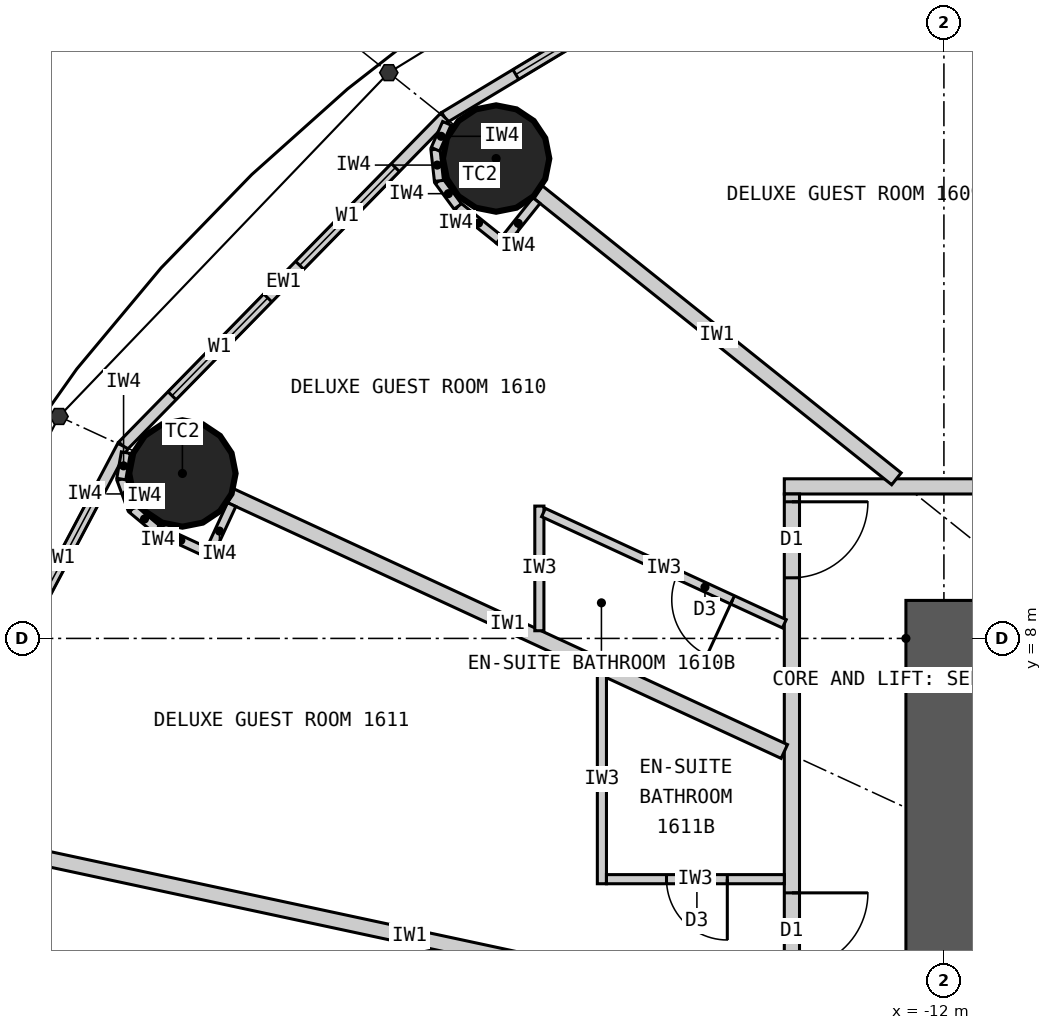
"""IFC4 building model, lengths in metres.
Left out: names, types, materials, properties, quantities, classifications, styles, units other than length and angle.
Written with IfcOpenShell. Run it as: python <this file> out.ifc"""

import sys

from ifc_helpers import new_model, si_unit, direction, frame, frame_2d, origin, origin_2d, place, context, subcontext, project, spatial, rectangle, circle, extrude, element, fill, save


model = new_model("IFC4")
c1 = context("Model", 3, precision=1e-05, world=origin(), true_north=direction((0.0, 1.0)))
c2 = subcontext(c1, "Body", "Model", "MODEL_VIEW")
j1 = project(units=[si_unit("LENGTHUNIT", "METRE"), si_unit("PLANEANGLEUNIT", "RADIAN")], contexts=[c1])
p1 = place(None, origin())
s1 = spatial("IfcSite", under=j1, at=p1, CompositionType="ELEMENT")
p2 = place(p1, origin())
s2 = spatial("IfcBuilding", under=s1, at=p2, CompositionType="ELEMENT")
p3 = place(p2, frame((0.0, 0.0, 67.2)))
s3 = spatial("IfcBuildingStorey", under=s2, at=p3, CompositionType="ELEMENT", Elevation=67.2)
for number, where, z_axis, x_axis in (
    (1, (-17.892, 14.313, 0.0), (0.0, 0.0, 1.0), (1.0, 0.0, 0.0)),
    (2, (-22.019, 10.17, 0.0), (0.0, 0.0, 1.0), (1.0, 0.0, 0.0)),
):
    element("IfcColumn", number, at=place(p3, frame(where, z_axis=z_axis, x_axis=x_axis)), inside=s3, PredefinedType="COLUMN", context=c2, shape_type="SweptSolid", body=[
        extrude(circle(Radius=0.7, at=origin_2d()), origin(), (0.0, 0.0, 1.0), 3.3),
    ])
p4 = place(p3, frame((-12.5, 8.0, 0.0), z_axis=(0.0, 0.0, 1.0), x_axis=(1.0, 0.0, 0.0)))
e3 = element("IfcWall", 3, at=p4, inside=s3, PredefinedType="SHEAR", context=c2, shape_type="SweptSolid", body=[
    extrude(rectangle(XDim=25.0, YDim=1.0, at=frame_2d((12.5, 0.0))), origin(), (0.0, 0.0, 1.0), 3.3),
])
p5 = place(p4, frame((11.2, 0.0, 0.0)))
e4 = element("IfcOpeningElement", 4, at=p5, cuts=e3, PredefinedType="OPENING", context=c2, shape_type="SweptSolid", body=[
    extrude(rectangle(XDim=1.2, YDim=2.2, at=frame_2d((0.6, 1.1))), frame((0.0, 0.51, 0.0), z_axis=(0.0, -1.0, 0.0), x_axis=(1.0, 0.0, 0.0)), (0.0, 0.0, 1.0), 1.02),
])
p6 = place(p4, frame((18.8, 0.0, 0.0)))
e5 = element("IfcOpeningElement", 5, at=p6, cuts=e3, PredefinedType="OPENING", context=c2, shape_type="SweptSolid", body=[
    extrude(rectangle(XDim=0.9, YDim=2.2, at=frame_2d((0.45, 1.1))), frame((0.0, 0.51, 0.0), z_axis=(0.0, -1.0, 0.0), x_axis=(1.0, 0.0, 0.0)), (0.0, 0.0, 1.0), 1.02),
])
p7 = place(p3, frame((-12.0, 7.5, 0.0), z_axis=(0.0, 0.0, 1.0), x_axis=(0.0, -1.0, 0.0)))
e6 = element("IfcWall", 6, at=p7, inside=s3, PredefinedType="SHEAR", context=c2, shape_type="SweptSolid", body=[
    extrude(rectangle(XDim=15.0, YDim=1.0, at=frame_2d((7.5, 0.0))), origin(), (0.0, 0.0, 1.0), 3.3),
])
p8 = place(p7, frame((6.6, 0.0, 0.0)))
e7 = element("IfcOpeningElement", 7, at=p8, cuts=e6, PredefinedType="OPENING", context=c2, shape_type="SweptSolid", body=[
    extrude(rectangle(XDim=1.8, YDim=2.2, at=frame_2d((0.9, 1.1))), frame((0.0, 0.51, 0.0), z_axis=(0.0, -1.0, 0.0), x_axis=(1.0, 0.0, 0.0)), (0.0, 0.0, 1.0), 1.02),
])
p9 = place(p3, frame((-13.096, 18.147, 0.0), z_axis=(0.0, 0.0, 1.0), x_axis=(-0.856983180864, -0.515344377787, 0.0)))
e8 = element("IfcWall", 8, at=p9, inside=s3, PredefinedType="ELEMENTEDWALL", context=c2, shape_type="SweptSolid", body=[
    extrude(rectangle(XDim=6.386, YDim=0.15, at=frame_2d((3.193, 0.0))), origin(), (0.0, 0.0, 1.0), 3.12),
])
p10 = place(p9, frame((1.093, 0.0, 0.9)))
e9 = element("IfcOpeningElement", 9, at=p10, cuts=e8, PredefinedType="OPENING", context=c2, shape_type="SweptSolid", body=[
    extrude(rectangle(XDim=1.8, YDim=1.9, at=frame_2d((0.9, 0.95))), frame((0.0, 0.085, 0.0), z_axis=(0.0, -1.0, 0.0), x_axis=(1.0, 0.0, 0.0)), (0.0, 0.0, 1.0), 0.17),
])
p11 = place(p9, frame((3.493, 0.0, 0.9)))
e10 = element("IfcOpeningElement", 10, at=p11, cuts=e8, PredefinedType="OPENING", context=c2, shape_type="SweptSolid", body=[
    extrude(rectangle(XDim=1.8, YDim=1.9, at=frame_2d((0.9, 0.95))), frame((0.0, 0.085, 0.0), z_axis=(0.0, -1.0, 0.0), x_axis=(1.0, 0.0, 0.0)), (0.0, 0.0, 1.0), 0.17),
])
p12 = place(p3, frame((-18.57, 14.856, 0.0), z_axis=(0.0, 0.0, 1.0), x_axis=(-0.699602905915, -0.714531856557, 0.0)))
e11 = element("IfcWall", 11, at=p12, inside=s3, PredefinedType="ELEMENTEDWALL", context=c2, shape_type="SweptSolid", body=[
    extrude(rectangle(XDim=6.051, YDim=0.15, at=frame_2d((3.025, 0.0))), origin(), (0.0, 0.0, 1.0), 3.12),
])
p13 = place(p12, frame((0.926, 0.0, 0.9)))
e12 = element("IfcOpeningElement", 12, at=p13, cuts=e11, PredefinedType="OPENING", context=c2, shape_type="SweptSolid", body=[
    extrude(rectangle(XDim=1.8, YDim=1.9, at=frame_2d((0.9, 0.95))), frame((0.0, 0.085, 0.0), z_axis=(0.0, -1.0, 0.0), x_axis=(1.0, 0.0, 0.0)), (0.0, 0.0, 1.0), 0.17),
])
p14 = place(p12, frame((3.325, 0.0, 0.9)))
e13 = element("IfcOpeningElement", 13, at=p14, cuts=e11, PredefinedType="OPENING", context=c2, shape_type="SweptSolid", body=[
    extrude(rectangle(XDim=1.8, YDim=1.9, at=frame_2d((0.9, 0.95))), frame((0.0, 0.085, 0.0), z_axis=(0.0, -1.0, 0.0), x_axis=(1.0, 0.0, 0.0)), (0.0, 0.0, 1.0), 0.17),
])
p15 = place(p3, frame((-22.803, 10.532, 0.0), z_axis=(0.0, 0.0, 1.0), x_axis=(-0.467296867008, -0.884100468321, 0.0)))
e14 = element("IfcWall", 14, at=p15, inside=s3, PredefinedType="ELEMENTEDWALL", context=c2, shape_type="SweptSolid", body=[
    extrude(rectangle(XDim=5.734, YDim=0.15, at=frame_2d((2.867, 0.0))), origin(), (0.0, 0.0, 1.0), 3.12),
])
p16 = place(p15, frame((0.767, 0.0, 0.9)))
e15 = element("IfcOpeningElement", 15, at=p16, cuts=e14, PredefinedType="OPENING", context=c2, shape_type="SweptSolid", body=[
    extrude(rectangle(XDim=1.8, YDim=1.9, at=frame_2d((0.9, 0.95))), frame((0.0, 0.085, 0.0), z_axis=(0.0, -1.0, 0.0), x_axis=(1.0, 0.0, 0.0)), (0.0, 0.0, 1.0), 0.17),
])
p17 = place(p15, frame((3.167, 0.0, 0.9)))
e16 = element("IfcOpeningElement", 16, at=p17, cuts=e14, PredefinedType="OPENING", context=c2, shape_type="SweptSolid", body=[
    extrude(rectangle(XDim=1.8, YDim=1.9, at=frame_2d((0.9, 0.95))), frame((0.0, 0.085, 0.0), z_axis=(0.0, -1.0, 0.0), x_axis=(1.0, 0.0, 0.0)), (0.0, 0.0, 1.0), 0.17),
])
p18 = place(p3, frame((-14.1, 10.0, 0.0), z_axis=(0.0, 0.0, 1.0), x_axis=(1.0, 0.0, 0.0)))
e17 = element("IfcWall", 17, at=p18, inside=s3, PredefinedType="PARTITIONING", context=c2, shape_type="SweptSolid", body=[
    extrude(rectangle(XDim=28.2, YDim=0.2, at=frame_2d((14.1, 0.0))), origin(), (0.0, 0.0, 1.0), 3.12),
])
p19 = place(p18, frame((18.529, 0.0, 0.0)))
e18 = element("IfcOpeningElement", 18, at=p19, cuts=e17, PredefinedType="OPENING", context=c2, shape_type="SweptSolid", body=[
    extrude(rectangle(XDim=1.0, YDim=2.2, at=frame_2d((0.5, 1.1))), frame((0.0, 0.11, 0.0), z_axis=(0.0, -1.0, 0.0), x_axis=(1.0, 0.0, 0.0)), (0.0, 0.0, 1.0), 0.22),
])
p20 = place(p18, frame((14.623, 0.0, 0.0)))
e19 = element("IfcOpeningElement", 19, at=p20, cuts=e17, PredefinedType="OPENING", context=c2, shape_type="SweptSolid", body=[
    extrude(rectangle(XDim=1.0, YDim=2.2, at=frame_2d((0.5, 1.1))), frame((0.0, 0.11, 0.0), z_axis=(0.0, -1.0, 0.0), x_axis=(1.0, 0.0, 0.0)), (0.0, 0.0, 1.0), 0.22),
])
p21 = place(p18, frame((11.24, 0.0, 0.0)))
e20 = element("IfcOpeningElement", 20, at=p21, cuts=e17, PredefinedType="OPENING", context=c2, shape_type="SweptSolid", body=[
    extrude(rectangle(XDim=1.0, YDim=2.2, at=frame_2d((0.5, 1.1))), frame((0.0, 0.11, 0.0), z_axis=(0.0, -1.0, 0.0), x_axis=(1.0, 0.0, 0.0)), (0.0, 0.0, 1.0), 0.22),
])
p22 = place(p18, frame((8.671, 0.0, 0.0)))
e21 = element("IfcOpeningElement", 21, at=p22, cuts=e17, PredefinedType="OPENING", context=c2, shape_type="SweptSolid", body=[
    extrude(rectangle(XDim=1.0, YDim=2.2, at=frame_2d((0.5, 1.1))), frame((0.0, 0.11, 0.0), z_axis=(0.0, -1.0, 0.0), x_axis=(1.0, 0.0, 0.0)), (0.0, 0.0, 1.0), 0.22),
])
p23 = place(p18, frame((2.801, 0.0, 0.0)))
e22 = element("IfcOpeningElement", 22, at=p23, cuts=e17, PredefinedType="OPENING", context=c2, shape_type="SweptSolid", body=[
    extrude(rectangle(XDim=1.0, YDim=2.2, at=frame_2d((0.5, 1.1))), frame((0.0, 0.11, 0.0), z_axis=(0.0, -1.0, 0.0), x_axis=(1.0, 0.0, 0.0)), (0.0, 0.0, 1.0), 0.22),
])
p24 = place(p3, frame((-14.0, 9.9, 0.0), z_axis=(0.0, 0.0, 1.0), x_axis=(0.0, -1.0, 0.0)))
e23 = element("IfcWall", 23, at=p24, inside=s3, PredefinedType="PARTITIONING", context=c2, shape_type="SweptSolid", body=[
    extrude(rectangle(XDim=19.8, YDim=0.2, at=frame_2d((9.9, 0.0))), origin(), (0.0, 0.0, 1.0), 3.12),
])
p25 = place(p24, frame((0.103, 0.0, 0.0)))
e24 = element("IfcOpeningElement", 24, at=p25, cuts=e23, PredefinedType="OPENING", context=c2, shape_type="SweptSolid", body=[
    extrude(rectangle(XDim=1.0, YDim=2.2, at=frame_2d((0.5, 1.1))), frame((0.0, 0.11, 0.0), z_axis=(0.0, -1.0, 0.0), x_axis=(1.0, 0.0, 0.0)), (0.0, 0.0, 1.0), 0.22),
])
p26 = place(p24, frame((5.248, 0.0, 0.0)))
e25 = element("IfcOpeningElement", 25, at=p26, cuts=e23, PredefinedType="OPENING", context=c2, shape_type="SweptSolid", body=[
    extrude(rectangle(XDim=1.0, YDim=2.2, at=frame_2d((0.5, 1.1))), frame((0.0, 0.11, 0.0), z_axis=(0.0, -1.0, 0.0), x_axis=(1.0, 0.0, 0.0)), (0.0, 0.0, 1.0), 0.22),
])
p27 = place(p24, frame((9.438, 0.0, 0.0)))
e26 = element("IfcOpeningElement", 26, at=p27, cuts=e23, PredefinedType="OPENING", context=c2, shape_type="SweptSolid", body=[
    extrude(rectangle(XDim=1.0, YDim=2.2, at=frame_2d((0.5, 1.1))), frame((0.0, 0.11, 0.0), z_axis=(0.0, -1.0, 0.0), x_axis=(1.0, 0.0, 0.0)), (0.0, 0.0, 1.0), 0.22),
])
p28 = place(p24, frame((13.942, 0.0, 0.0)))
e27 = element("IfcOpeningElement", 27, at=p28, cuts=e23, PredefinedType="OPENING", context=c2, shape_type="SweptSolid", body=[
    extrude(rectangle(XDim=1.0, YDim=2.2, at=frame_2d((0.5, 1.1))), frame((0.0, 0.11, 0.0), z_axis=(0.0, -1.0, 0.0), x_axis=(1.0, 0.0, 0.0)), (0.0, 0.0, 1.0), 0.22),
])
p29 = place(p24, frame((18.698, 0.0, 0.0)))
e28 = element("IfcOpeningElement", 28, at=p29, cuts=e23, PredefinedType="OPENING", context=c2, shape_type="SweptSolid", body=[
    extrude(rectangle(XDim=1.0, YDim=2.2, at=frame_2d((0.5, 1.1))), frame((0.0, 0.11, 0.0), z_axis=(0.0, -1.0, 0.0), x_axis=(1.0, 0.0, 0.0)), (0.0, 0.0, 1.0), 0.22),
])
p30 = place(p3, frame((-7.289, 10.1, 0.0), z_axis=(0.0, 0.0, 1.0), x_axis=(-0.585198353053, 0.810890182197, 0.0)))
e29 = element("IfcWall", 29, at=p30, inside=s3, PredefinedType="PARTITIONING", context=c2, shape_type="SweptSolid", body=[
    extrude(rectangle(XDim=8.36, YDim=0.2, at=frame_2d((4.18, 0.0))), origin(), (0.0, 0.0, 1.0), 2.32),
])
p31 = place(p3, frame((-12.625, 10.1, 0.0), z_axis=(0.0, 0.0, 1.0), x_axis=(-0.780892451574, 0.624665493744, 0.0)))
e30 = element("IfcWall", 30, at=p31, inside=s3, PredefinedType="PARTITIONING", context=c2, shape_type="SweptSolid", body=[
    extrude(rectangle(XDim=6.045, YDim=0.2, at=frame_2d((3.022, 0.0))), origin(), (0.0, 0.0, 1.0), 2.32),
])
p32 = place(p3, frame((-14.1, 6.512, 0.0), z_axis=(0.0, 0.0, 1.0), x_axis=(-0.907832871056, 0.419332181247, 0.0)))
e31 = element("IfcWall", 31, at=p32, inside=s3, PredefinedType="PARTITIONING", context=c2, shape_type="SweptSolid", body=[
    extrude(rectangle(XDim=8.023, YDim=0.2, at=frame_2d((4.011, 0.0))), origin(), (0.0, 0.0, 1.0), 2.32),
])
p33 = place(p3, frame((-14.1, 3.022, 0.0), z_axis=(0.0, 0.0, 1.0), x_axis=(-0.977790014929, 0.209586943072, 0.0)))
e32 = element("IfcWall", 32, at=p33, inside=s3, PredefinedType="PARTITIONING", context=c2, shape_type="SweptSolid", body=[
    extrude(rectangle(XDim=10.087, YDim=0.2, at=frame_2d((5.043, 0.0))), origin(), (0.0, 0.0, 1.0), 2.32),
])
p34 = place(p3, frame((-17.323, 8.101, 0.0), z_axis=(0.0, 0.0, 1.0), x_axis=(0.0, 1.0, 0.0)))
e33 = element("IfcWall", 33, at=p34, inside=s3, PredefinedType="PARTITIONING", context=c2, shape_type="SweptSolid", body=[
    extrude(rectangle(XDim=1.64, YDim=0.12, at=frame_2d((0.82, 0.0))), origin(), (0.0, 0.0, 1.0), 3.12),
])
p35 = place(p3, frame((-14.1, 8.193, 0.0), z_axis=(0.0, 0.0, 1.0), x_axis=(-0.907836493557, 0.419324338628, 0.0)))
e34 = element("IfcWall", 34, at=p35, inside=s3, PredefinedType="PARTITIONING", context=c2, shape_type="SweptSolid", body=[
    extrude(rectangle(XDim=3.49, YDim=0.12, at=frame_2d((1.745, 0.0))), origin(), (0.0, 0.0, 1.0), 3.12),
])
p36 = place(p35, frame((0.75, 0.0, 0.0)))
e35 = element("IfcOpeningElement", 35, at=p36, cuts=e34, PredefinedType="OPENING", context=c2, shape_type="SweptSolid", body=[
    extrude(rectangle(XDim=0.8, YDim=2.1, at=frame_2d((0.4, 1.05))), frame((0.0, 0.07, 0.0), z_axis=(0.0, -1.0, 0.0), x_axis=(1.0, 0.0, 0.0)), (0.0, 0.0, 1.0), 0.14),
])
p37 = place(p3, frame((-16.5, 7.521, 0.0), z_axis=(0.0, 0.0, 1.0), x_axis=(0.0, -1.0, 0.0)))
e36 = element("IfcWall", 36, at=p37, inside=s3, PredefinedType="PARTITIONING", context=c2, shape_type="SweptSolid", body=[
    extrude(rectangle(XDim=2.749, YDim=0.12, at=frame_2d((1.374, 0.0))), origin(), (0.0, 0.0, 1.0), 3.12),
])
p38 = place(p3, frame((-14.1, 4.833, 0.0), z_axis=(0.0, 0.0, 1.0), x_axis=(-1.0, 0.0, 0.0)))
e37 = element("IfcWall", 37, at=p38, inside=s3, PredefinedType="PARTITIONING", context=c2, shape_type="SweptSolid", body=[
    extrude(rectangle(XDim=2.34, YDim=0.12, at=frame_2d((1.17, 0.0))), origin(), (0.0, 0.0, 1.0), 3.12),
])
p39 = place(p38, frame((0.75, 0.0, 0.0)))
e38 = element("IfcOpeningElement", 38, at=p39, cuts=e37, PredefinedType="OPENING", context=c2, shape_type="SweptSolid", body=[
    extrude(rectangle(XDim=0.8, YDim=2.1, at=frame_2d((0.4, 1.05))), frame((0.0, 0.07, 0.0), z_axis=(0.0, -1.0, 0.0), x_axis=(1.0, 0.0, 0.0)), (0.0, 0.0, 1.0), 0.14),
])
p40 = place(p3, frame((-17.361, 13.76, 0.0), z_axis=(0.0, 0.0, 1.0), x_axis=(-0.624501042889, -0.781023973659, 0.0)))
e39 = element("IfcWall", 39, at=p40, inside=s3, PredefinedType="PARTITIONING", context=c2, shape_type="SweptSolid", body=[
    extrude(rectangle(XDim=0.767, YDim=0.12, at=frame_2d((0.384, 0.0))), origin(), (0.0, 0.0, 1.0), 3.12),
])
p41 = place(p3, frame((-17.85, 13.246, 0.0), z_axis=(0.0, 0.0, 1.0), x_axis=(-0.780902834923, 0.62465251333, 0.0)))
e40 = element("IfcWall", 40, at=p41, inside=s3, PredefinedType="PARTITIONING", context=c2, shape_type="SweptSolid", body=[
    extrude(rectangle(XDim=0.7, YDim=0.12, at=frame_2d((0.35, 0.0))), origin(), (0.0, 0.0, 1.0), 3.12),
])
for number, where, z_axis, x_axis in (
    (41, (-18.396, 13.683, 0.0), (0.0, 0.0, 1.0), (-0.592, 0.806, 0.0)),
    (42, (-18.644, 14.02, 0.0), (0.0, 0.0, 1.0), (-0.11, 0.994, 0.0)),
):
    element("IfcWall", number, at=place(p3, frame(where, z_axis=z_axis, x_axis=x_axis)), inside=s3, PredefinedType="PARTITIONING", context=c2, shape_type="SweptSolid", body=[
        extrude(rectangle(XDim=0.418, YDim=0.12, at=frame_2d((0.209, 0.0))), origin(), (0.0, 0.0, 1.0), 3.12),
    ])
p42 = place(p3, frame((-18.69, 14.435, 0.0), z_axis=(0.0, 0.0, 1.0), x_axis=(0.401093412634, 0.91603715773, 0.0)))
e43 = element("IfcWall", 43, at=p42, inside=s3, PredefinedType="PARTITIONING", context=c2, shape_type="SweptSolid", body=[
    extrude(rectangle(XDim=0.373, YDim=0.12, at=frame_2d((0.187, 0.0))), origin(), (0.0, 0.0, 1.0), 3.12),
])
p43 = place(p3, frame((-21.371, 9.761, 0.0), z_axis=(0.0, 0.0, 1.0), x_axis=(-0.419259891039, -0.907866258744, 0.0)))
e44 = element("IfcWall", 44, at=p43, inside=s3, PredefinedType="PARTITIONING", context=c2, shape_type="SweptSolid", body=[
    extrude(rectangle(XDim=0.768, YDim=0.12, at=frame_2d((0.384, 0.0))), origin(), (0.0, 0.0, 1.0), 3.12),
])
p44 = place(p3, frame((-21.722, 9.144, 0.0), z_axis=(0.0, 0.0, 1.0), x_axis=(-0.907877701396, 0.419235112208, 0.0)))
e45 = element("IfcWall", 45, at=p44, inside=s3, PredefinedType="PARTITIONING", context=c2, shape_type="SweptSolid", body=[
    extrude(rectangle(XDim=0.7, YDim=0.12, at=frame_2d((0.35, 0.0))), origin(), (0.0, 0.0, 1.0), 3.12),
])
p45 = place(p3, frame((-22.358, 9.437, 0.0), z_axis=(0.0, 0.0, 1.0), x_axis=(-0.768412687942, 0.639954639806, 0.0)))
e46 = element("IfcWall", 46, at=p45, inside=s3, PredefinedType="PARTITIONING", context=c2, shape_type="SweptSolid", body=[
    extrude(rectangle(XDim=0.418, YDim=0.12, at=frame_2d((0.209, 0.0))), origin(), (0.0, 0.0, 1.0), 3.12),
])
p46 = place(p3, frame((-22.679, 9.705, 0.0), z_axis=(0.0, 0.0, 1.0), x_axis=(-0.345164001646, 0.938542386879, 0.0)))
e47 = element("IfcWall", 47, at=p46, inside=s3, PredefinedType="PARTITIONING", context=c2, shape_type="SweptSolid", body=[
    extrude(rectangle(XDim=0.418, YDim=0.12, at=frame_2d((0.209, 0.0))), origin(), (0.0, 0.0, 1.0), 3.12),
])
p47 = place(p3, frame((-22.823, 10.097, 0.0), z_axis=(0.0, 0.0, 1.0), x_axis=(0.169674995186, 0.985500074079, 0.0)))
e48 = element("IfcWall", 48, at=p47, inside=s3, PredefinedType="PARTITIONING", context=c2, shape_type="SweptSolid", body=[
    extrude(rectangle(XDim=0.353, YDim=0.12, at=frame_2d((0.176, 0.0))), origin(), (0.0, 0.0, 1.0), 3.12),
])
p48 = place(p11, origin())
e49 = element("IfcWindow", 49, at=p48, inside=s3, PartitioningType="SINGLE_PANEL", PredefinedType="WINDOW", context=c2, shape_type="SweptSolid", body=[
    extrude(rectangle(XDim=1.8, YDim=1.9, at=frame_2d((0.9, 0.95))), frame((0.0, 0.03, 0.0), z_axis=(0.0, -1.0, 0.0), x_axis=(1.0, 0.0, 0.0)), (0.0, 0.0, 1.0), 0.06),
])
fill(e10, e49)
p49 = place(p13, origin())
e50 = element("IfcWindow", 50, at=p49, inside=s3, PartitioningType="SINGLE_PANEL", PredefinedType="WINDOW", context=c2, shape_type="SweptSolid", body=[
    extrude(rectangle(XDim=1.8, YDim=1.9, at=frame_2d((0.9, 0.95))), frame((0.0, 0.03, 0.0), z_axis=(0.0, -1.0, 0.0), x_axis=(1.0, 0.0, 0.0)), (0.0, 0.0, 1.0), 0.06),
])
fill(e12, e50)
p50 = place(p14, origin())
e51 = element("IfcWindow", 51, at=p50, inside=s3, PartitioningType="SINGLE_PANEL", PredefinedType="WINDOW", context=c2, shape_type="SweptSolid", body=[
    extrude(rectangle(XDim=1.8, YDim=1.9, at=frame_2d((0.9, 0.95))), frame((0.0, 0.03, 0.0), z_axis=(0.0, -1.0, 0.0), x_axis=(1.0, 0.0, 0.0)), (0.0, 0.0, 1.0), 0.06),
])
fill(e13, e51)
p51 = place(p16, origin())
e52 = element("IfcWindow", 52, at=p51, inside=s3, PartitioningType="SINGLE_PANEL", PredefinedType="WINDOW", context=c2, shape_type="SweptSolid", body=[
    extrude(rectangle(XDim=1.8, YDim=1.9, at=frame_2d((0.9, 0.95))), frame((0.0, 0.03, 0.0), z_axis=(0.0, -1.0, 0.0), x_axis=(1.0, 0.0, 0.0)), (0.0, 0.0, 1.0), 0.06),
])
fill(e15, e52)
p52 = place(p36, origin())
e53 = element("IfcDoor", 53, at=p52, inside=s3, OperationType="SINGLE_SWING_LEFT", PredefinedType="DOOR", context=c2, shape_type="SweptSolid", body=[
    extrude(rectangle(XDim=0.8, YDim=2.1, at=frame_2d((0.4, 1.05))), frame((0.0, 0.025, 0.0), z_axis=(0.0, -1.0, 0.0), x_axis=(1.0, 0.0, 0.0)), (0.0, 0.0, 1.0), 0.05),
])
fill(e35, e53)
p53 = place(p25, origin())
e54 = element("IfcDoor", 54, at=p53, inside=s3, OperationType="SINGLE_SWING_LEFT", PredefinedType="DOOR", context=c2, shape_type="SweptSolid", body=[
    extrude(rectangle(XDim=1.0, YDim=2.2, at=frame_2d((0.5, 1.1))), frame((0.0, 0.025, 0.0), z_axis=(0.0, -1.0, 0.0), x_axis=(1.0, 0.0, 0.0)), (0.0, 0.0, 1.0), 0.05),
])
fill(e24, e54)
p54 = place(p39, origin())
e55 = element("IfcDoor", 55, at=p54, inside=s3, OperationType="SINGLE_SWING_LEFT", PredefinedType="DOOR", context=c2, shape_type="SweptSolid", body=[
    extrude(rectangle(XDim=0.8, YDim=2.1, at=frame_2d((0.4, 1.05))), frame((0.0, 0.025, 0.0), z_axis=(0.0, -1.0, 0.0), x_axis=(1.0, 0.0, 0.0)), (0.0, 0.0, 1.0), 0.05),
])
fill(e38, e55)
p55 = place(p26, origin())
e56 = element("IfcDoor", 56, at=p55, inside=s3, OperationType="SINGLE_SWING_LEFT", PredefinedType="DOOR", context=c2, shape_type="SweptSolid", body=[
    extrude(rectangle(XDim=1.0, YDim=2.2, at=frame_2d((0.5, 1.1))), frame((0.0, 0.025, 0.0), z_axis=(0.0, -1.0, 0.0), x_axis=(1.0, 0.0, 0.0)), (0.0, 0.0, 1.0), 0.05),
])
fill(e25, e56)
save(model, sys.argv[1])
